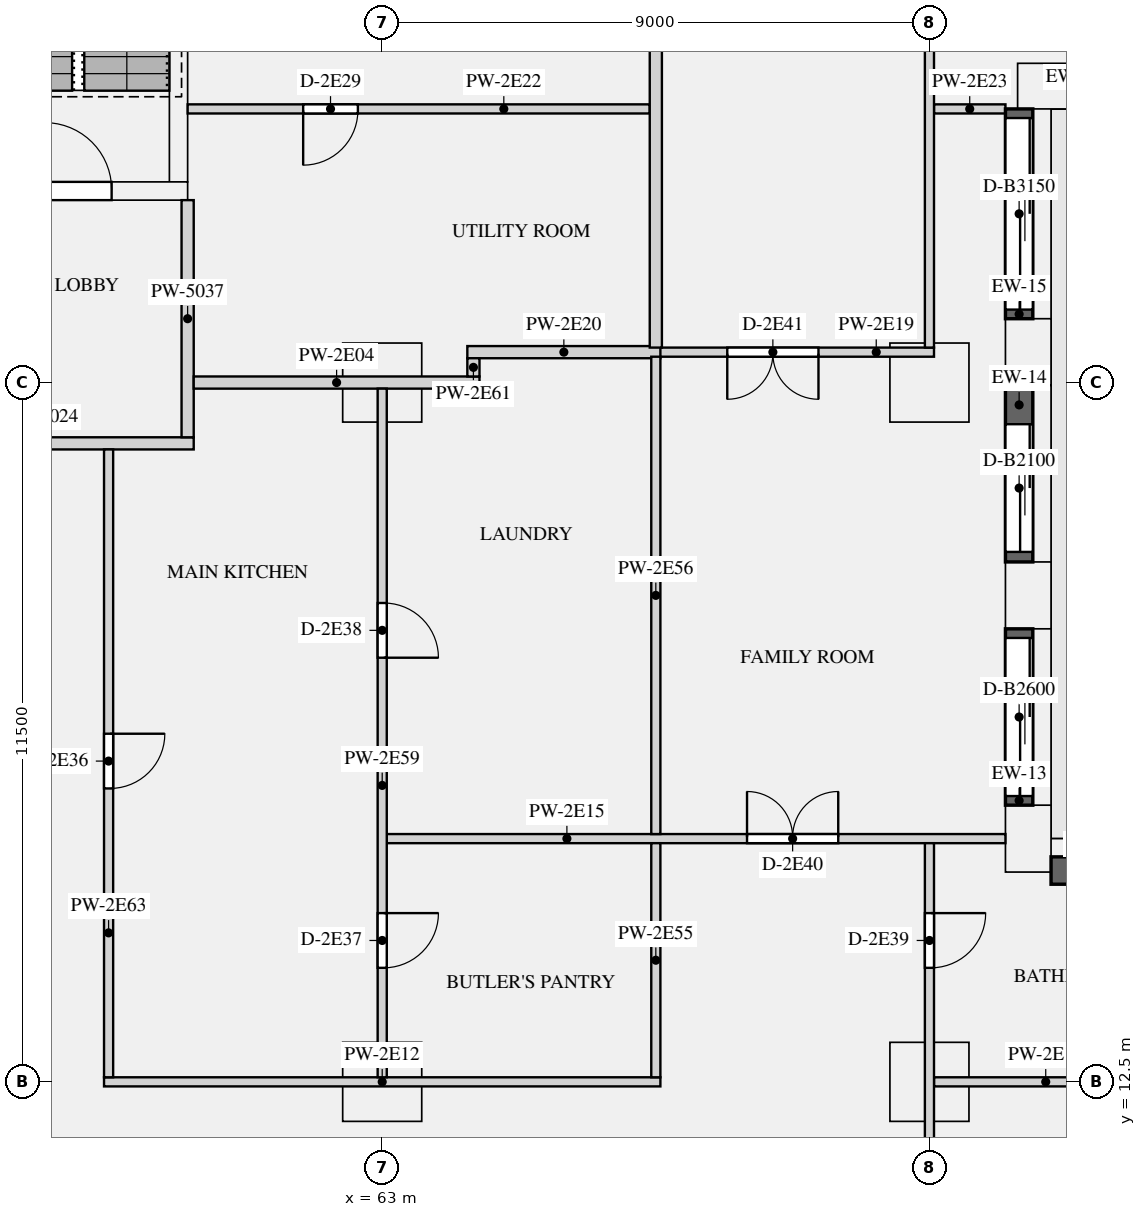
"""IFC4 building model, lengths in metres.
Left out: names, types, materials, properties, quantities, classifications, styles, units other than length and angle.
Written with IfcOpenShell. Run it as: python <this file> out.ifc"""

import sys

from ifc_helpers import new_model, si_unit, direction, frame, frame_2d, origin, origin_2d, place, context, subcontext, project, spatial, rectangle, extrude, element, fill, save


model = new_model("IFC4")
c1 = context("Model", 3, precision=1e-05, world=origin(), true_north=direction((0.0, 1.0)))
c2 = subcontext(c1, "Body", "Model", "MODEL_VIEW")
j1 = project(units=[si_unit("LENGTHUNIT", "METRE"), si_unit("PLANEANGLEUNIT", "RADIAN")], contexts=[c1])
p1 = place(None, origin())
s1 = spatial("IfcSite", under=j1, at=p1, CompositionType="ELEMENT")
p2 = place(p1, origin())
s2 = spatial("IfcBuilding", under=s1, at=p2, CompositionType="ELEMENT")
p3 = place(p2, frame((0.0, 0.0, 118.2)))
s3 = spatial("IfcBuildingStorey", under=s2, at=p3, CompositionType="ELEMENT", Elevation=118.2)
for number, where, z_axis, x_axis in (
    (1, (73.625, 16.5, 0.0), (0.0, 0.0, 1.0), (0.0, 1.0, 0.0)),
    (2, (73.625, 20.5, 0.0), (0.0, 0.0, 1.0), (0.0, 1.0, 0.0)),
    (3, (73.625, 24.5, 0.0), (0.0, 0.0, 1.0), (0.0, 1.0, 0.0)),
    (4, (74.0, 28.875, 0.0), (0.0, 0.0, 1.0), (1.0, 0.0, 0.0)),
):
    element("IfcColumn", number, at=place(p3, frame(where, z_axis=z_axis, x_axis=x_axis)), inside=s3, PredefinedType="USERDEFINED", context=c2, shape_type="SweptSolid", body=[
        extrude(rectangle(XDim=1.1, YDim=0.75, at=origin_2d()), origin(), (0.0, 0.0, 1.0), 3.15),
    ])
for number, where, z_axis, x_axis in (
    (5, (63.0, 24.0, 0.0), (0.0, 0.0, 1.0), (1.0, 0.0, 0.0)),
    (6, (72.0, 24.0, 0.0), (0.0, 0.0, 1.0), (1.0, 0.0, 0.0)),
    (7, (63.0, 12.5, 0.0), (0.0, 0.0, 1.0), (1.0, 0.0, 0.0)),
    (8, (72.0, 12.5, 0.0), (0.0, 0.0, 1.0), (1.0, 0.0, 0.0)),
):
    element("IfcColumn", number, at=place(p3, frame(where, z_axis=z_axis, x_axis=x_axis)), inside=s3, PredefinedType="COLUMN", context=c2, shape_type="SweptSolid", body=[
        extrude(rectangle(XDim=1.3, YDim=1.3, at=origin_2d()), origin(), (0.0, 0.0, 1.0), 3.15),
    ])
p4 = place(p3, frame((56.2, 27.15, 0.0), z_axis=(0.0, 0.0, 1.0), x_axis=(1.0, 0.0, 0.0)))
e9 = element("IfcWall", 9, at=p4, inside=s3, PredefinedType="SHEAR", context=c2, shape_type="SweptSolid", body=[
    extrude(rectangle(XDim=3.6, YDim=0.3, at=frame_2d((1.8, 0.0))), origin(), (0.0, 0.0, 1.0), 3.15),
])
p5 = place(p4, frame((1.25, 0.0, 0.0)))
e10 = element("IfcOpeningElement", 10, at=p5, cuts=e9, PredefinedType="OPENING", context=c2, shape_type="SweptSolid", body=[
    extrude(rectangle(XDim=1.1, YDim=2.1, at=frame_2d((0.55, 1.05))), frame((0.0, 0.16, 0.0), z_axis=(0.0, -1.0, 0.0), x_axis=(1.0, 0.0, 0.0)), (0.0, 0.0, 1.0), 0.32),
])
p6 = place(p3, frame((59.65, 27.3, 0.0), z_axis=(0.0, 0.0, 1.0), x_axis=(0.0, 1.0, 0.0)))
e11 = element("IfcWall", 11, at=p6, inside=s3, PredefinedType="SHEAR", context=c2, shape_type="SweptSolid", body=[
    extrude(rectangle(XDim=7.8, YDim=0.3, at=frame_2d((3.9, 0.0))), origin(), (0.0, 0.0, 1.0), 3.15),
])
p7 = place(p3, frame((75.4, 15.975, 0.9), z_axis=(0.0, 0.0, 1.0), x_axis=(-1.0, 0.0, 0.0)))
e12 = element("IfcWall", 12, at=p7, inside=s3, PredefinedType="SOLIDWALL", context=c2, shape_type="SweptSolid", body=[
    extrude(rectangle(XDim=1.4, YDim=0.45, at=frame_2d((0.7, 0.0))), origin(), (0.0, 0.0, 1.0), 1.93),
])
p8 = place(p3, frame((73.475, 17.05, 0.0), z_axis=(0.0, 0.0, 1.0), x_axis=(0.0, 1.0, 0.0)))
e13 = element("IfcWall", 13, at=p8, inside=s3, PredefinedType="SOLIDWALL", context=c2, shape_type="SweptSolid", body=[
    extrude(rectangle(XDim=2.9, YDim=0.45, at=frame_2d((1.45, 0.0))), origin(), (0.0, 0.0, 1.0), 2.83),
])
p9 = place(p8, frame((0.15, 0.0, 0.0)))
e14 = element("IfcOpeningElement", 14, at=p9, cuts=e13, PredefinedType="OPENING", context=c2, shape_type="SweptSolid", body=[
    extrude(rectangle(XDim=2.6, YDim=2.3, at=frame_2d((1.3, 1.15))), frame((0.0, 0.235, 0.0), z_axis=(0.0, -1.0, 0.0), x_axis=(1.0, 0.0, 0.0)), (0.0, 0.0, 1.0), 0.47),
])
p10 = place(p3, frame((73.475, 21.05, 0.0), z_axis=(0.0, 0.0, 1.0), x_axis=(0.0, 1.0, 0.0)))
e15 = element("IfcWall", 15, at=p10, inside=s3, PredefinedType="SOLIDWALL", context=c2, shape_type="SweptSolid", body=[
    extrude(rectangle(XDim=2.9, YDim=0.45, at=frame_2d((1.45, 0.0))), origin(), (0.0, 0.0, 1.0), 2.83),
])
p11 = place(p10, frame((0.165, 0.0, 0.0)))
e16 = element("IfcOpeningElement", 16, at=p11, cuts=e15, PredefinedType="OPENING", context=c2, shape_type="SweptSolid", body=[
    extrude(rectangle(XDim=2.1, YDim=2.3, at=frame_2d((1.05, 1.15))), frame((0.0, 0.235, 0.0), z_axis=(0.0, -1.0, 0.0), x_axis=(1.0, 0.0, 0.0)), (0.0, 0.0, 1.0), 0.47),
])
p12 = place(p3, frame((73.475, 25.05, 0.0), z_axis=(0.0, 0.0, 1.0), x_axis=(0.0, 1.0, 0.0)))
e17 = element("IfcWall", 17, at=p12, inside=s3, PredefinedType="SOLIDWALL", context=c2, shape_type="SweptSolid", body=[
    extrude(rectangle(XDim=3.45, YDim=0.45, at=frame_2d((1.725, 0.0))), origin(), (0.0, 0.0, 1.0), 2.83),
])
p13 = place(p12, frame((0.15, 0.0, 0.0)))
e18 = element("IfcOpeningElement", 18, at=p13, cuts=e17, PredefinedType="OPENING", context=c2, shape_type="SweptSolid", body=[
    extrude(rectangle(XDim=3.15, YDim=2.3, at=frame_2d((1.575, 1.15))), frame((0.0, 0.235, 0.0), z_axis=(0.0, -1.0, 0.0), x_axis=(1.0, 0.0, 0.0)), (0.0, 0.0, 1.0), 0.47),
])
p14 = place(p3, frame((54.9, 23.0, 0.0), z_axis=(0.0, 0.0, 1.0), x_axis=(1.0, 0.0, 0.0)))
e19 = element("IfcWall", 19, at=p14, inside=s3, PredefinedType="PARTITIONING", context=c2, shape_type="SweptSolid", body=[
    extrude(rectangle(XDim=5.0, YDim=0.2, at=frame_2d((2.5, 0.0))), origin(), (0.0, 0.0, 1.0), 2.83),
])
p15 = place(p3, frame((59.8, 23.1, 0.0), z_axis=(0.0, 0.0, 1.0), x_axis=(0.0, 1.0, 0.0)))
e20 = element("IfcWall", 20, at=p15, inside=s3, PredefinedType="PARTITIONING", context=c2, shape_type="SweptSolid", body=[
    extrude(rectangle(XDim=3.9, YDim=0.2, at=frame_2d((1.95, 0.0))), origin(), (0.0, 0.0, 1.0), 2.83),
])
p16 = place(p3, frame((59.9, 24.0, 0.0), z_axis=(0.0, 0.0, 1.0), x_axis=(1.0, 0.0, 0.0)))
e21 = element("IfcWall", 21, at=p16, inside=s3, PredefinedType="PARTITIONING", context=c2, shape_type="SweptSolid", body=[
    extrude(rectangle(XDim=4.7, YDim=0.2, at=frame_2d((2.35, 0.0))), origin(), (0.0, 0.0, 1.0), 2.83),
])
p17 = place(p3, frame((58.425, 12.5, 0.0), z_axis=(0.0, 0.0, 1.0), x_axis=(1.0, 0.0, 0.0)))
e22 = element("IfcWall", 22, at=p17, inside=s3, PredefinedType="PARTITIONING", context=c2, shape_type="SweptSolid", body=[
    extrude(rectangle(XDim=9.15, YDim=0.15, at=frame_2d((4.575, 0.0))), origin(), (0.0, 0.0, 1.0), 2.83),
])
p18 = place(p3, frame((72.075, 12.5, 0.0), z_axis=(0.0, 0.0, 1.0), x_axis=(1.0, 0.0, 0.0)))
e23 = element("IfcWall", 23, at=p18, inside=s3, PredefinedType="PARTITIONING", context=c2, shape_type="SweptSolid", body=[
    extrude(rectangle(XDim=3.675, YDim=0.15, at=frame_2d((1.837, 0.0))), origin(), (0.0, 0.0, 1.0), 2.83),
])
p19 = place(p3, frame((63.075, 16.5, 0.0), z_axis=(0.0, 0.0, 1.0), x_axis=(1.0, 0.0, 0.0)))
e24 = element("IfcWall", 24, at=p19, inside=s3, PredefinedType="PARTITIONING", context=c2, shape_type="SweptSolid", body=[
    extrude(rectangle(XDim=10.175, YDim=0.15, at=frame_2d((5.087, 0.0))), origin(), (0.0, 0.0, 1.0), 2.83),
])
p20 = place(p19, frame((5.925, 0.0, 0.0)))
e25 = element("IfcOpeningElement", 25, at=p20, cuts=e24, PredefinedType="OPENING", context=c2, shape_type="SweptSolid", body=[
    extrude(rectangle(XDim=1.5, YDim=2.1, at=frame_2d((0.75, 1.05))), frame((0.0, 0.085, 0.0), z_axis=(0.0, -1.0, 0.0), x_axis=(1.0, 0.0, 0.0)), (0.0, 0.0, 1.0), 0.17),
])
p21 = place(p3, frame((67.425, 24.5, 0.0), z_axis=(0.0, 0.0, 1.0), x_axis=(1.0, 0.0, 0.0)))
e26 = element("IfcWall", 26, at=p21, inside=s3, PredefinedType="PARTITIONING", context=c2, shape_type="SweptSolid", body=[
    extrude(rectangle(XDim=4.65, YDim=0.15, at=frame_2d((2.325, 0.0))), origin(), (0.0, 0.0, 1.0), 2.83),
])
p22 = place(p21, frame((1.25, 0.0, 0.0)))
e27 = element("IfcOpeningElement", 27, at=p22, cuts=e26, PredefinedType="OPENING", context=c2, shape_type="SweptSolid", body=[
    extrude(rectangle(XDim=1.5, YDim=2.1, at=frame_2d((0.75, 1.05))), frame((0.0, 0.085, 0.0), z_axis=(0.0, -1.0, 0.0), x_axis=(1.0, 0.0, 0.0)), (0.0, 0.0, 1.0), 0.17),
])
p23 = place(p3, frame((64.4, 24.5, 0.0), z_axis=(0.0, 0.0, 1.0), x_axis=(1.0, 0.0, 0.0)))
e28 = element("IfcWall", 28, at=p23, inside=s3, PredefinedType="PARTITIONING", context=c2, shape_type="SweptSolid", body=[
    extrude(rectangle(XDim=3.175, YDim=0.2, at=frame_2d((1.587, 0.0))), origin(), (0.0, 0.0, 1.0), 2.83),
])
p24 = place(p3, frame((59.8, 28.5, 0.0), z_axis=(0.0, 0.0, 1.0), x_axis=(1.0, 0.0, 0.0)))
e29 = element("IfcWall", 29, at=p24, inside=s3, PredefinedType="PARTITIONING", context=c2, shape_type="SweptSolid", body=[
    extrude(rectangle(XDim=7.6, YDim=0.15, at=frame_2d((3.8, 0.0))), origin(), (0.0, 0.0, 1.0), 2.83),
])
p25 = place(p24, frame((1.9, 0.0, 0.0)))
e30 = element("IfcOpeningElement", 30, at=p25, cuts=e29, PredefinedType="OPENING", context=c2, shape_type="SweptSolid", body=[
    extrude(rectangle(XDim=0.9, YDim=2.1, at=frame_2d((0.45, 1.05))), frame((0.0, 0.085, 0.0), z_axis=(0.0, -1.0, 0.0), x_axis=(1.0, 0.0, 0.0)), (0.0, 0.0, 1.0), 0.17),
])
p26 = place(p3, frame((72.075, 28.5, 0.0), z_axis=(0.0, 0.0, 1.0), x_axis=(1.0, 0.0, 0.0)))
e31 = element("IfcWall", 31, at=p26, inside=s3, PredefinedType="PARTITIONING", context=c2, shape_type="SweptSolid", body=[
    extrude(rectangle(XDim=1.175, YDim=0.15, at=frame_2d((0.587, 0.0))), origin(), (0.0, 0.0, 1.0), 2.83),
])
p27 = place(p3, frame((67.5, 12.575, 0.0), z_axis=(0.0, 0.0, 1.0), x_axis=(0.0, 1.0, 0.0)))
e32 = element("IfcWall", 32, at=p27, inside=s3, PredefinedType="PARTITIONING", context=c2, shape_type="SweptSolid", body=[
    extrude(rectangle(XDim=3.85, YDim=0.15, at=frame_2d((1.925, 0.0))), origin(), (0.0, 0.0, 1.0), 2.83),
])
p28 = place(p3, frame((67.5, 16.575, 0.0), z_axis=(0.0, 0.0, 1.0), x_axis=(0.0, 1.0, 0.0)))
e33 = element("IfcWall", 33, at=p28, inside=s3, PredefinedType="PARTITIONING", context=c2, shape_type="SweptSolid", body=[
    extrude(rectangle(XDim=7.85, YDim=0.15, at=frame_2d((3.925, 0.0))), origin(), (0.0, 0.0, 1.0), 2.83),
])
p29 = place(p3, frame((67.5, 24.575, 0.0), z_axis=(0.0, 0.0, 1.0), x_axis=(0.0, 1.0, 0.0)))
e34 = element("IfcWall", 34, at=p29, inside=s3, PredefinedType="PARTITIONING", context=c2, shape_type="SweptSolid", body=[
    extrude(rectangle(XDim=20.175, YDim=0.2, at=frame_2d((10.087, 0.0))), origin(), (0.0, 0.0, 1.0), 2.83),
])
p30 = place(p3, frame((63.0, 12.575, 0.0), z_axis=(0.0, 0.0, 1.0), x_axis=(0.0, 1.0, 0.0)))
e35 = element("IfcWall", 35, at=p30, inside=s3, PredefinedType="PARTITIONING", context=c2, shape_type="SweptSolid", body=[
    extrude(rectangle(XDim=11.325, YDim=0.15, at=frame_2d((5.663, 0.0))), origin(), (0.0, 0.0, 1.0), 2.83),
])
p31 = place(p30, frame((1.8, 0.0, 0.0)))
e36 = element("IfcOpeningElement", 36, at=p31, cuts=e35, PredefinedType="OPENING", context=c2, shape_type="SweptSolid", body=[
    extrude(rectangle(XDim=0.9, YDim=2.1, at=frame_2d((0.45, 1.05))), frame((0.0, 0.085, 0.0), z_axis=(0.0, -1.0, 0.0), x_axis=(1.0, 0.0, 0.0)), (0.0, 0.0, 1.0), 0.17),
])
p32 = place(p30, frame((6.9, 0.0, 0.0)))
e37 = element("IfcOpeningElement", 37, at=p32, cuts=e35, PredefinedType="OPENING", context=c2, shape_type="SweptSolid", body=[
    extrude(rectangle(XDim=0.9, YDim=2.1, at=frame_2d((0.45, 1.05))), frame((0.0, 0.085, 0.0), z_axis=(0.0, -1.0, 0.0), x_axis=(1.0, 0.0, 0.0)), (0.0, 0.0, 1.0), 0.17),
])
p33 = place(p3, frame((64.5, 24.1, 0.0), z_axis=(0.0, 0.0, 1.0), x_axis=(0.0, 1.0, 0.0)))
e38 = element("IfcWall", 38, at=p33, inside=s3, PredefinedType="PARTITIONING", context=c2, shape_type="SweptSolid", body=[
    extrude(rectangle(XDim=0.3, YDim=0.2, at=frame_2d((0.15, 0.0))), origin(), (0.0, 0.0, 1.0), 2.83),
])
p34 = place(p3, frame((58.5, 12.575, 0.0), z_axis=(0.0, 0.0, 1.0), x_axis=(0.0, 1.0, 0.0)))
e39 = element("IfcWall", 39, at=p34, inside=s3, PredefinedType="PARTITIONING", context=c2, shape_type="SweptSolid", body=[
    extrude(rectangle(XDim=10.325, YDim=0.15, at=frame_2d((5.163, 0.0))), origin(), (0.0, 0.0, 1.0), 2.83),
])
p35 = place(p34, frame((4.75, 0.0, 0.0)))
e40 = element("IfcOpeningElement", 40, at=p35, cuts=e39, PredefinedType="OPENING", context=c2, shape_type="SweptSolid", body=[
    extrude(rectangle(XDim=0.9, YDim=2.1, at=frame_2d((0.45, 1.05))), frame((0.0, 0.085, 0.0), z_axis=(0.0, -1.0, 0.0), x_axis=(1.0, 0.0, 0.0)), (0.0, 0.0, 1.0), 0.17),
])
p36 = place(p3, frame((72.0, 5.25, 0.0), z_axis=(0.0, 0.0, 1.0), x_axis=(0.0, 1.0, 0.0)))
e41 = element("IfcWall", 41, at=p36, inside=s3, PredefinedType="PARTITIONING", context=c2, shape_type="SweptSolid", body=[
    extrude(rectangle(XDim=11.175, YDim=0.15, at=frame_2d((5.587, 0.0))), origin(), (0.0, 0.0, 1.0), 2.83),
])
p37 = place(p36, frame((4.475, 0.0, 0.0)))
e42 = element("IfcOpeningElement", 42, at=p37, cuts=e41, PredefinedType="OPENING", context=c2, shape_type="SweptSolid", body=[
    extrude(rectangle(XDim=0.9, YDim=2.1, at=frame_2d((0.45, 1.05))), frame((0.0, 0.085, 0.0), z_axis=(0.0, -1.0, 0.0), x_axis=(1.0, 0.0, 0.0)), (0.0, 0.0, 1.0), 0.17),
])
p38 = place(p36, frame((9.125, 0.0, 0.0)))
e43 = element("IfcOpeningElement", 43, at=p38, cuts=e41, PredefinedType="OPENING", context=c2, shape_type="SweptSolid", body=[
    extrude(rectangle(XDim=0.9, YDim=2.1, at=frame_2d((0.45, 1.05))), frame((0.0, 0.085, 0.0), z_axis=(0.0, -1.0, 0.0), x_axis=(1.0, 0.0, 0.0)), (0.0, 0.0, 1.0), 0.17),
])
p39 = place(p3, frame((72.0, 24.575, 0.0), z_axis=(0.0, 0.0, 1.0), x_axis=(0.0, 1.0, 0.0)))
e44 = element("IfcWall", 44, at=p39, inside=s3, PredefinedType="PARTITIONING", context=c2, shape_type="SweptSolid", body=[
    extrude(rectangle(XDim=15.675, YDim=0.15, at=frame_2d((7.837, 0.0))), origin(), (0.0, 0.0, 1.0), 2.83),
])
p40 = place(p39, frame((6.65, 0.0, 0.0)))
e45 = element("IfcOpeningElement", 45, at=p40, cuts=e44, PredefinedType="OPENING", context=c2, shape_type="SweptSolid", body=[
    extrude(rectangle(XDim=0.9, YDim=2.1, at=frame_2d((0.45, 1.05))), frame((0.0, 0.085, 0.0), z_axis=(0.0, -1.0, 0.0), x_axis=(1.0, 0.0, 0.0)), (0.0, 0.0, 1.0), 0.17),
])
p41 = place(p9, origin())
e46 = element("IfcDoor", 46, at=p41, inside=s3, OperationType="SLIDING_TO_LEFT", PredefinedType="DOOR", context=c2, shape_type="SweptSolid", body=[
    extrude(rectangle(XDim=2.6, YDim=2.3, at=frame_2d((1.3, 1.15))), frame((0.0, -0.07, 0.0), z_axis=(0.0, -1.0, 0.0), x_axis=(1.0, 0.0, 0.0)), (0.0, 0.0, 1.0), 0.05),
])
fill(e14, e46)
p42 = place(p11, origin())
e47 = element("IfcDoor", 47, at=p42, inside=s3, OperationType="SLIDING_TO_LEFT", PredefinedType="DOOR", context=c2, shape_type="SweptSolid", body=[
    extrude(rectangle(XDim=2.1, YDim=2.3, at=frame_2d((1.05, 1.15))), frame((0.0, -0.07, 0.0), z_axis=(0.0, -1.0, 0.0), x_axis=(1.0, 0.0, 0.0)), (0.0, 0.0, 1.0), 0.05),
])
fill(e16, e47)
p43 = place(p13, origin())
e48 = element("IfcDoor", 48, at=p43, inside=s3, OperationType="SLIDING_TO_LEFT", PredefinedType="DOOR", context=c2, shape_type="SweptSolid", body=[
    extrude(rectangle(XDim=3.15, YDim=2.3, at=frame_2d((1.575, 1.15))), frame((0.0, -0.07, 0.0), z_axis=(0.0, -1.0, 0.0), x_axis=(1.0, 0.0, 0.0)), (0.0, 0.0, 1.0), 0.05),
])
fill(e18, e48)
p44 = place(p5, origin())
e49 = element("IfcDoor", 49, at=p44, inside=s3, OperationType="SINGLE_SWING_LEFT", PredefinedType="DOOR", context=c2, shape_type="SweptSolid", body=[
    extrude(rectangle(XDim=1.1, YDim=2.1, at=frame_2d((0.55, 1.05))), frame((0.0, 0.025, 0.0), z_axis=(0.0, -1.0, 0.0), x_axis=(1.0, 0.0, 0.0)), (0.0, 0.0, 1.0), 0.05),
])
fill(e10, e49)
p45 = place(p25, frame((0.9, 0.0, 0.0), z_axis=(0.0, 0.0, 1.0), x_axis=(-1.0, 0.0, 0.0)))
e50 = element("IfcDoor", 50, at=p45, inside=s3, OperationType="SINGLE_SWING_RIGHT", PredefinedType="DOOR", context=c2, shape_type="SweptSolid", body=[
    extrude(rectangle(XDim=0.9, YDim=2.1, at=frame_2d((0.45, 1.05))), frame((0.0, 0.025, 0.0), z_axis=(0.0, -1.0, 0.0), x_axis=(1.0, 0.0, 0.0)), (0.0, 0.0, 1.0), 0.05),
])
fill(e30, e50)
p46 = place(p35, frame((0.9, 0.0, 0.0), z_axis=(0.0, 0.0, 1.0), x_axis=(-1.0, 0.0, 0.0)))
e51 = element("IfcDoor", 51, at=p46, inside=s3, OperationType="SINGLE_SWING_LEFT", PredefinedType="DOOR", context=c2, shape_type="SweptSolid", body=[
    extrude(rectangle(XDim=0.9, YDim=2.1, at=frame_2d((0.45, 1.05))), frame((0.0, 0.025, 0.0), z_axis=(0.0, -1.0, 0.0), x_axis=(1.0, 0.0, 0.0)), (0.0, 0.0, 1.0), 0.05),
])
fill(e40, e51)
p47 = place(p31, frame((0.9, 0.0, 0.0), z_axis=(0.0, 0.0, 1.0), x_axis=(-1.0, 0.0, 0.0)))
e52 = element("IfcDoor", 52, at=p47, inside=s3, OperationType="SINGLE_SWING_LEFT", PredefinedType="DOOR", context=c2, shape_type="SweptSolid", body=[
    extrude(rectangle(XDim=0.9, YDim=2.1, at=frame_2d((0.45, 1.05))), frame((0.0, 0.025, 0.0), z_axis=(0.0, -1.0, 0.0), x_axis=(1.0, 0.0, 0.0)), (0.0, 0.0, 1.0), 0.05),
])
fill(e36, e52)
p48 = place(p32, frame((0.9, 0.0, 0.0), z_axis=(0.0, 0.0, 1.0), x_axis=(-1.0, 0.0, 0.0)))
e53 = element("IfcDoor", 53, at=p48, inside=s3, OperationType="SINGLE_SWING_RIGHT", PredefinedType="DOOR", context=c2, shape_type="SweptSolid", body=[
    extrude(rectangle(XDim=0.9, YDim=2.1, at=frame_2d((0.45, 1.05))), frame((0.0, 0.025, 0.0), z_axis=(0.0, -1.0, 0.0), x_axis=(1.0, 0.0, 0.0)), (0.0, 0.0, 1.0), 0.05),
])
fill(e37, e53)
p49 = place(p38, frame((0.9, 0.0, 0.0), z_axis=(0.0, 0.0, 1.0), x_axis=(-1.0, 0.0, 0.0)))
e54 = element("IfcDoor", 54, at=p49, inside=s3, OperationType="SINGLE_SWING_LEFT", PredefinedType="DOOR", context=c2, shape_type="SweptSolid", body=[
    extrude(rectangle(XDim=0.9, YDim=2.1, at=frame_2d((0.45, 1.05))), frame((0.0, 0.025, 0.0), z_axis=(0.0, -1.0, 0.0), x_axis=(1.0, 0.0, 0.0)), (0.0, 0.0, 1.0), 0.05),
])
fill(e43, e54)
p50 = place(p20, origin())
e55 = element("IfcDoor", 55, at=p50, inside=s3, OperationType="DOUBLE_DOOR_SINGLE_SWING", PredefinedType="DOOR", context=c2, shape_type="SweptSolid", body=[
    extrude(rectangle(XDim=1.5, YDim=2.1, at=frame_2d((0.75, 1.05))), frame((0.0, 0.025, 0.0), z_axis=(0.0, -1.0, 0.0), x_axis=(1.0, 0.0, 0.0)), (0.0, 0.0, 1.0), 0.05),
])
fill(e25, e55)
p51 = place(p22, frame((1.5, 0.0, 0.0), z_axis=(0.0, 0.0, 1.0), x_axis=(-1.0, 0.0, 0.0)))
e56 = element("IfcDoor", 56, at=p51, inside=s3, OperationType="DOUBLE_DOOR_SINGLE_SWING", PredefinedType="DOOR", context=c2, shape_type="SweptSolid", body=[
    extrude(rectangle(XDim=1.5, YDim=2.1, at=frame_2d((0.75, 1.05))), frame((0.0, 0.025, 0.0), z_axis=(0.0, -1.0, 0.0), x_axis=(1.0, 0.0, 0.0)), (0.0, 0.0, 1.0), 0.05),
])
fill(e27, e56)
save(model, sys.argv[1])
